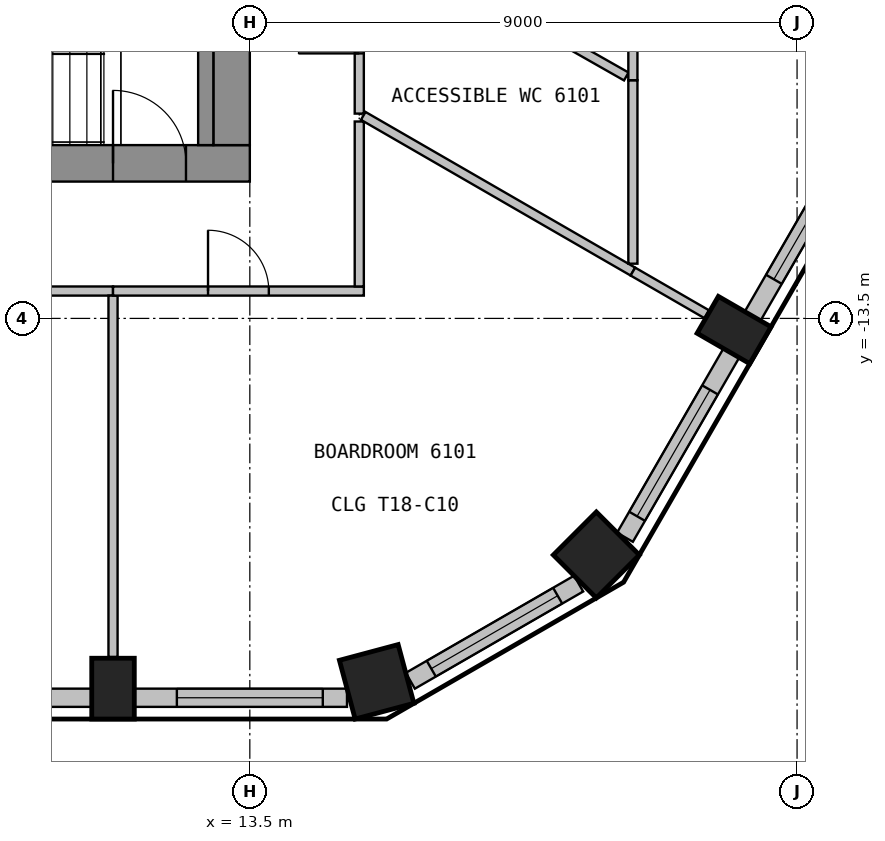
"""IFC4 building model, lengths in metres.
Left out: names, types, materials, properties, quantities, classifications, styles, units other than length and angle.
Written with IfcOpenShell. Run it as: python <this file> out.ifc"""

import sys

from ifc_helpers import new_model, si_unit, direction, frame, frame_2d, origin, origin_2d, place, context, subcontext, project, spatial, rectangle, extrude, element, fill, save


model = new_model("IFC4")
c1 = context("Model", 3, precision=1e-05, world=origin(), true_north=direction((0.0, 1.0)))
c2 = subcontext(c1, "Body", "Model", "MODEL_VIEW")
j1 = project(units=[si_unit("LENGTHUNIT", "METRE"), si_unit("PLANEANGLEUNIT", "RADIAN")], contexts=[c1])
p1 = place(None, origin())
s1 = spatial("IfcSite", under=j1, at=p1, CompositionType="ELEMENT")
p2 = place(p1, origin())
s2 = spatial("IfcBuilding", under=s1, at=p2, CompositionType="ELEMENT")
p3 = place(p2, frame((0.0, 0.0, 246.9)))
s3 = spatial("IfcBuildingStorey", under=s2, at=p3, CompositionType="ELEMENT", Elevation=246.9)
p4 = place(p3, frame((11.25, -19.588, 0.0), z_axis=(0.0, 0.0, 1.0), x_axis=(1.0, 0.0, 0.0)))
e1 = element("IfcColumn", 1, at=p4, inside=s3, PredefinedType="COLUMN", context=c2, shape_type="SweptSolid", body=[
    extrude(rectangle(XDim=0.7, YDim=1.0, at=origin_2d()), origin(), (0.0, 0.0, 1.0), 3.575),
])
for number, where, z_axis, x_axis in (
    (2, (15.586, -19.476, 0.0), (0.0, 0.0, 1.0), (0.966, 0.259, 0.0)),
    (3, (19.199, -17.39, 0.0), (0.0, 0.0, 1.0), (0.707, 0.707, 0.0)),
):
    element("IfcColumn", number, at=place(p3, frame(where, z_axis=z_axis, x_axis=x_axis)), inside=s3, PredefinedType="COLUMN", context=c2, shape_type="SweptSolid", body=[
        extrude(rectangle(XDim=1.0, YDim=1.0, at=origin_2d()), origin(), (0.0, 0.0, 1.0), 3.575),
    ])
p5 = place(p3, frame((21.464, -13.691, 0.0), z_axis=(0.0, 0.0, 1.0), x_axis=(0.5, 0.866025403784, 0.0)))
e4 = element("IfcColumn", 4, at=p5, inside=s3, PredefinedType="COLUMN", context=c2, shape_type="SweptSolid", body=[
    extrude(rectangle(XDim=0.7, YDim=1.0, at=origin_2d()), origin(), (0.0, 0.0, 1.0), 3.575),
])
p6 = place(p3, frame((7.101, -19.739, 0.0), z_axis=(0.0, 0.0, 1.0), x_axis=(1.0, 0.0, 0.0)))
e5 = element("IfcWall", 5, at=p6, inside=s3, PredefinedType="SOLIDWALL", context=c2, shape_type="SweptSolid", body=[
    extrude(rectangle(XDim=3.799, YDim=0.3, at=frame_2d((1.899, 0.0))), origin(), (0.0, 0.0, 1.0), 3.575),
])
p7 = place(p6, frame((0.699, 0.0, 0.9)))
e6 = element("IfcOpeningElement", 6, at=p7, cuts=e5, PredefinedType="OPENING", context=c2, shape_type="SweptSolid", body=[
    extrude(rectangle(XDim=2.4, YDim=2.1, at=frame_2d((1.2, 1.05))), frame((0.0, 0.16, 0.0), z_axis=(0.0, -1.0, 0.0), x_axis=(1.0, 0.0, 0.0)), (0.0, 0.0, 1.0), 0.32),
])
p8 = place(p3, frame((11.601, -19.739, 0.0), z_axis=(0.0, 0.0, 1.0), x_axis=(1.0, 0.0, 0.0)))
e7 = element("IfcWall", 7, at=p8, inside=s3, PredefinedType="SOLIDWALL", context=c2, shape_type="SweptSolid", body=[
    extrude(rectangle(XDim=3.498, YDim=0.3, at=frame_2d((1.749, 0.0))), origin(), (0.0, 0.0, 1.0), 3.575),
])
p9 = place(p8, frame((0.699, 0.0, 0.9)))
e8 = element("IfcOpeningElement", 8, at=p9, cuts=e7, PredefinedType="OPENING", context=c2, shape_type="SweptSolid", body=[
    extrude(rectangle(XDim=2.4, YDim=2.1, at=frame_2d((1.2, 1.05))), frame((0.0, 0.16, 0.0), z_axis=(0.0, -1.0, 0.0), x_axis=(1.0, 0.0, 0.0)), (0.0, 0.0, 1.0), 0.32),
])
p10 = place(p3, frame((16.14, -19.459, 0.0), z_axis=(0.0, 0.0, 1.0), x_axis=(0.866025316205, 0.500000151692, 0.0)))
e9 = element("IfcWall", 9, at=p10, inside=s3, PredefinedType="SOLIDWALL", context=c2, shape_type="SweptSolid", body=[
    extrude(rectangle(XDim=3.196, YDim=0.3, at=frame_2d((1.598, 0.0))), origin(), (0.0, 0.0, 1.0), 3.575),
])
p11 = place(p10, frame((0.398, 0.0, 0.9)))
e10 = element("IfcOpeningElement", 10, at=p11, cuts=e9, PredefinedType="OPENING", context=c2, shape_type="SweptSolid", body=[
    extrude(rectangle(XDim=2.4, YDim=2.1, at=frame_2d((1.2, 1.05))), frame((0.0, 0.16, 0.0), z_axis=(0.0, -1.0, 0.0), x_axis=(1.0, 0.0, 0.0)), (0.0, 0.0, 1.0), 0.32),
])
p12 = place(p3, frame((19.67, -17.099, 0.0), z_axis=(0.0, 0.0, 1.0), x_axis=(0.499960102815, 0.866048437209, 0.0)))
e11 = element("IfcWall", 11, at=p12, inside=s3, PredefinedType="SOLIDWALL", context=c2, shape_type="SweptSolid", body=[
    extrude(rectangle(XDim=3.498, YDim=0.3, at=frame_2d((1.749, 0.0))), origin(), (0.0, 0.0, 1.0), 3.575),
])
p13 = place(p12, frame((0.398, 0.0, 0.9)))
e12 = element("IfcOpeningElement", 12, at=p13, cuts=e11, PredefinedType="OPENING", context=c2, shape_type="SweptSolid", body=[
    extrude(rectangle(XDim=2.4, YDim=2.1, at=frame_2d((1.2, 1.05))), frame((0.0, 0.16, 0.0), z_axis=(0.0, -1.0, 0.0), x_axis=(1.0, 0.0, 0.0)), (0.0, 0.0, 1.0), 0.32),
])
p14 = place(p3, frame((21.769, -13.463, 0.0), z_axis=(0.0, 0.0, 1.0), x_axis=(0.499982058975, 0.866035761792, 0.0)))
e13 = element("IfcWall", 13, at=p14, inside=s3, PredefinedType="SOLIDWALL", context=c2, shape_type="SweptSolid", body=[
    extrude(rectangle(XDim=3.799, YDim=0.3, at=frame_2d((1.899, 0.0))), origin(), (0.0, 0.0, 1.0), 3.575),
])
p15 = place(p14, frame((0.699, 0.0, 0.9)))
e14 = element("IfcOpeningElement", 14, at=p15, cuts=e13, PredefinedType="OPENING", context=c2, shape_type="SweptSolid", body=[
    extrude(rectangle(XDim=2.4, YDim=2.1, at=frame_2d((1.2, 1.05))), frame((0.0, 0.16, 0.0), z_axis=(0.0, -1.0, 0.0), x_axis=(1.0, 0.0, 0.0)), (0.0, 0.0, 1.0), 0.32),
])
p16 = place(p3, frame((-13.5, -10.95, 0.0), z_axis=(0.0, 0.0, 1.0), x_axis=(1.0, 0.0, 0.0)))
e15 = element("IfcWall", 15, at=p16, inside=s3, PredefinedType="SHEAR", context=c2, shape_type="SweptSolid", body=[
    extrude(rectangle(XDim=27.0, YDim=0.6, at=frame_2d((13.5, 0.0))), origin(), (0.0, 0.0, 1.0), 3.575),
])
p17 = place(p16, frame((12.3, 0.0, 0.0)))
e16 = element("IfcOpeningElement", 16, at=p17, cuts=e15, PredefinedType="OPENING", context=c2, shape_type="SweptSolid", body=[
    extrude(rectangle(XDim=2.4, YDim=2.1, at=frame_2d((1.2, 1.05))), frame((0.0, 0.31, 0.0), z_axis=(0.0, -1.0, 0.0), x_axis=(1.0, 0.0, 0.0)), (0.0, 0.0, 1.0), 0.62),
])
p18 = place(p16, frame((1.05, 0.0, 0.0)))
e17 = element("IfcOpeningElement", 17, at=p18, cuts=e15, PredefinedType="OPENING", context=c2, shape_type="SweptSolid", body=[
    extrude(rectangle(XDim=1.2, YDim=2.1, at=frame_2d((0.6, 1.05))), frame((0.0, 0.31, 0.0), z_axis=(0.0, -1.0, 0.0), x_axis=(1.0, 0.0, 0.0)), (0.0, 0.0, 1.0), 0.62),
])
p19 = place(p16, frame((24.75, 0.0, 0.0)))
e18 = element("IfcOpeningElement", 18, at=p19, cuts=e15, PredefinedType="OPENING", context=c2, shape_type="SweptSolid", body=[
    extrude(rectangle(XDim=1.2, YDim=2.1, at=frame_2d((0.6, 1.05))), frame((0.0, 0.31, 0.0), z_axis=(0.0, -1.0, 0.0), x_axis=(1.0, 0.0, 0.0)), (0.0, 0.0, 1.0), 0.62),
])
p20 = place(p3, frame((13.2, -10.65, 0.0), z_axis=(0.0, 0.0, 1.0), x_axis=(0.0, 1.0, 0.0)))
e19 = element("IfcWall", 19, at=p20, inside=s3, PredefinedType="SHEAR", context=c2, shape_type="SweptSolid", body=[
    extrude(rectangle(XDim=21.3, YDim=0.6, at=frame_2d((10.65, 0.0))), origin(), (0.0, 0.0, 1.0), 3.575),
])
p21 = place(p20, frame((9.45, 0.0, 0.0)))
e20 = element("IfcOpeningElement", 20, at=p21, cuts=e19, PredefinedType="OPENING", context=c2, shape_type="SweptSolid", body=[
    extrude(rectangle(XDim=2.4, YDim=2.1, at=frame_2d((1.2, 1.05))), frame((0.0, 0.31, 0.0), z_axis=(0.0, -1.0, 0.0), x_axis=(1.0, 0.0, 0.0)), (0.0, 0.0, 1.0), 0.62),
])
p22 = place(p3, frame((12.775, -10.65, 0.0), z_axis=(0.0, 0.0, 1.0), x_axis=(0.0, 1.0, 0.0)))
e21 = element("IfcWall", 21, at=p22, inside=s3, PredefinedType="SHEAR", context=c2, shape_type="SweptSolid", body=[
    extrude(rectangle(XDim=3.25, YDim=0.25, at=frame_2d((1.625, 0.0))), origin(), (0.0, 0.0, 1.0), 3.575),
])
p23 = place(p3, frame((-2.25, -13.05, 0.0), z_axis=(0.0, 0.0, 1.0), x_axis=(1.0, 0.0, 0.0)))
e22 = element("IfcWall", 22, at=p23, inside=s3, PredefinedType="PARTITIONING", context=c2, shape_type="SweptSolid", body=[
    extrude(rectangle(XDim=13.5, YDim=0.15, at=frame_2d((6.75, 0.0))), origin(), (0.0, 0.0, 1.0), 3.575),
])
p24 = place(p23, frame((6.25, 0.0, 0.0)))
e23 = element("IfcOpeningElement", 23, at=p24, cuts=e22, PredefinedType="OPENING", context=c2, shape_type="SweptSolid", body=[
    extrude(rectangle(XDim=1.0, YDim=2.1, at=frame_2d((0.5, 1.05))), frame((0.0, 0.085, 0.0), z_axis=(0.0, -1.0, 0.0), x_axis=(1.0, 0.0, 0.0)), (0.0, 0.0, 1.0), 0.17),
])
p25 = place(p3, frame((11.25, -13.125, 0.0), z_axis=(0.0, 0.0, 1.0), x_axis=(0.0, -1.0, 0.0)))
e24 = element("IfcWall", 24, at=p25, inside=s3, PredefinedType="PARTITIONING", context=c2, shape_type="SweptSolid", body=[
    extrude(rectangle(XDim=5.944, YDim=0.15, at=frame_2d((2.972, 0.0))), origin(), (0.0, 0.0, 1.0), 3.575),
])
p26 = place(p3, frame((11.25, -13.05, 0.0), z_axis=(0.0, 0.0, 1.0), x_axis=(1.0, 0.0, 0.0)))
e25 = element("IfcWall", 25, at=p26, inside=s3, PredefinedType="PARTITIONING", context=c2, shape_type="SweptSolid", body=[
    extrude(rectangle(XDim=4.125, YDim=0.15, at=frame_2d((2.062, 0.0))), origin(), (0.0, 0.0, 1.0), 3.575),
])
p27 = place(p26, frame((1.562, 0.0, 0.0)))
e26 = element("IfcOpeningElement", 26, at=p27, cuts=e25, PredefinedType="OPENING", context=c2, shape_type="SweptSolid", body=[
    extrude(rectangle(XDim=1.0, YDim=2.1, at=frame_2d((0.5, 1.05))), frame((0.0, 0.085, 0.0), z_axis=(0.0, -1.0, 0.0), x_axis=(1.0, 0.0, 0.0)), (0.0, 0.0, 1.0), 0.17),
])
p28 = place(p3, frame((15.3, -12.975, 0.0), z_axis=(0.0, 0.0, 1.0), x_axis=(0.0, 1.0, 0.0)))
e27 = element("IfcWall", 27, at=p28, inside=s3, PredefinedType="PARTITIONING", context=c2, shape_type="SweptSolid", body=[
    extrude(rectangle(XDim=2.713, YDim=0.15, at=frame_2d((1.356, 0.0))), origin(), (0.0, 0.0, 1.0), 3.575),
])
p29 = place(p3, frame((15.3, -10.132, 0.0), z_axis=(0.0, 0.0, 1.0), x_axis=(0.0, 1.0, 0.0)))
e28 = element("IfcWall", 28, at=p29, inside=s3, PredefinedType="PARTITIONING", context=c2, shape_type="SweptSolid", body=[
    extrude(rectangle(XDim=2.98, YDim=0.15, at=frame_2d((1.49, 0.0))), origin(), (0.0, 0.0, 1.0), 3.575),
])
p30 = place(p29, frame((0.99, 0.0, 0.0)))
e29 = element("IfcOpeningElement", 29, at=p30, cuts=e28, PredefinedType="OPENING", context=c2, shape_type="SweptSolid", body=[
    extrude(rectangle(XDim=1.0, YDim=2.1, at=frame_2d((0.5, 1.05))), frame((0.0, 0.085, 0.0), z_axis=(0.0, -1.0, 0.0), x_axis=(1.0, 0.0, 0.0)), (0.0, 0.0, 1.0), 0.17),
])
p31 = place(p3, frame((15.365, -10.169, 0.0), z_axis=(0.0, 0.0, 1.0), x_axis=(0.866028396804, -0.499994815902, 0.0)))
e30 = element("IfcWall", 30, at=p31, inside=s3, PredefinedType="PARTITIONING", context=c2, shape_type="SweptSolid", body=[
    extrude(rectangle(XDim=5.121, YDim=0.15, at=frame_2d((2.561, 0.0))), origin(), (0.0, 0.0, 1.0), 3.575),
])
p32 = place(p3, frame((15.365, -7.064, 0.0), z_axis=(0.0, 0.0, 1.0), x_axis=(0.869523611324, -0.493891374039, 0.0)))
e31 = element("IfcWall", 31, at=p32, inside=s3, PredefinedType="PARTITIONING", context=c2, shape_type="SweptSolid", body=[
    extrude(rectangle(XDim=4.975, YDim=0.15, at=frame_2d((2.488, 0.0))), origin(), (0.0, 0.0, 1.0), 3.575),
])
p33 = place(p3, frame((19.8, -9.583, 0.0), z_axis=(0.0, 0.0, 1.0), x_axis=(0.0, -1.0, 0.0)))
e32 = element("IfcWall", 32, at=p33, inside=s3, PredefinedType="PARTITIONING", context=c2, shape_type="SweptSolid", body=[
    extrude(rectangle(XDim=3.017, YDim=0.15, at=frame_2d((1.509, 0.0))), origin(), (0.0, 0.0, 1.0), 3.575),
])
p34 = place(p3, frame((19.8, -12.73, 0.0), z_axis=(0.0, 0.0, 1.0), x_axis=(0.865918715181, -0.500184744569, 0.0)))
e33 = element("IfcWall", 33, at=p34, inside=s3, PredefinedType="PARTITIONING", context=c2, shape_type="SweptSolid", body=[
    extrude(rectangle(XDim=1.402, YDim=0.15, at=frame_2d((0.701, 0.0))), origin(), (0.0, 0.0, 1.0), 3.575),
])
p35 = place(p3, frame((19.8, -2.325, 0.0), z_axis=(0.0, 0.0, 1.0), x_axis=(0.0, -1.0, 0.0)))
e34 = element("IfcWall", 34, at=p35, inside=s3, PredefinedType="PARTITIONING", context=c2, shape_type="SweptSolid", body=[
    extrude(rectangle(XDim=7.258, YDim=0.15, at=frame_2d((3.629, 0.0))), origin(), (0.0, 0.0, 1.0), 3.575),
])
p36 = place(p9, origin())
e35 = element("IfcWindow", 35, at=p36, inside=s3, PartitioningType="SINGLE_PANEL", PredefinedType="WINDOW", context=c2, shape_type="SweptSolid", body=[
    extrude(rectangle(XDim=2.4, YDim=2.1, at=frame_2d((1.2, 1.05))), frame((0.0, 0.03, 0.0), z_axis=(0.0, -1.0, 0.0), x_axis=(1.0, 0.0, 0.0)), (0.0, 0.0, 1.0), 0.06),
])
fill(e8, e35)
p37 = place(p11, origin())
e36 = element("IfcWindow", 36, at=p37, inside=s3, PartitioningType="SINGLE_PANEL", PredefinedType="WINDOW", context=c2, shape_type="SweptSolid", body=[
    extrude(rectangle(XDim=2.4, YDim=2.1, at=frame_2d((1.2, 1.05))), frame((0.0, 0.03, 0.0), z_axis=(0.0, -1.0, 0.0), x_axis=(1.0, 0.0, 0.0)), (0.0, 0.0, 1.0), 0.06),
])
fill(e10, e36)
p38 = place(p13, origin())
e37 = element("IfcWindow", 37, at=p38, inside=s3, PartitioningType="SINGLE_PANEL", PredefinedType="WINDOW", context=c2, shape_type="SweptSolid", body=[
    extrude(rectangle(XDim=2.4, YDim=2.1, at=frame_2d((1.2, 1.05))), frame((0.0, 0.03, 0.0), z_axis=(0.0, -1.0, 0.0), x_axis=(1.0, 0.0, 0.0)), (0.0, 0.0, 1.0), 0.06),
])
fill(e12, e37)
p39 = place(p15, origin())
e38 = element("IfcWindow", 38, at=p39, inside=s3, PartitioningType="SINGLE_PANEL", PredefinedType="WINDOW", context=c2, shape_type="SweptSolid", body=[
    extrude(rectangle(XDim=2.4, YDim=2.1, at=frame_2d((1.2, 1.05))), frame((0.0, 0.03, 0.0), z_axis=(0.0, -1.0, 0.0), x_axis=(1.0, 0.0, 0.0)), (0.0, 0.0, 1.0), 0.06),
])
fill(e14, e38)
p40 = place(p19, origin())
e39 = element("IfcDoor", 39, at=p40, inside=s3, OperationType="SINGLE_SWING_RIGHT", PredefinedType="DOOR", context=c2, shape_type="SweptSolid", body=[
    extrude(rectangle(XDim=1.2, YDim=2.1, at=frame_2d((0.6, 1.05))), frame((0.0, 0.025, 0.0), z_axis=(0.0, -1.0, 0.0), x_axis=(1.0, 0.0, 0.0)), (0.0, 0.0, 1.0), 0.05),
])
fill(e18, e39)
p41 = place(p27, origin())
e40 = element("IfcDoor", 40, at=p41, inside=s3, OperationType="SINGLE_SWING_RIGHT", PredefinedType="DOOR", context=c2, shape_type="SweptSolid", body=[
    extrude(rectangle(XDim=1.0, YDim=2.1, at=frame_2d((0.5, 1.05))), frame((0.0, 0.025, 0.0), z_axis=(0.0, -1.0, 0.0), x_axis=(1.0, 0.0, 0.0)), (0.0, 0.0, 1.0), 0.05),
])
fill(e26, e40)
p42 = place(p30, origin())
e41 = element("IfcDoor", 41, at=p42, inside=s3, OperationType="SINGLE_SWING_RIGHT", PredefinedType="DOOR", context=c2, shape_type="SweptSolid", body=[
    extrude(rectangle(XDim=1.0, YDim=2.1, at=frame_2d((0.5, 1.05))), frame((0.0, 0.025, 0.0), z_axis=(0.0, -1.0, 0.0), x_axis=(1.0, 0.0, 0.0)), (0.0, 0.0, 1.0), 0.05),
])
fill(e29, e41)
save(model, sys.argv[1])
